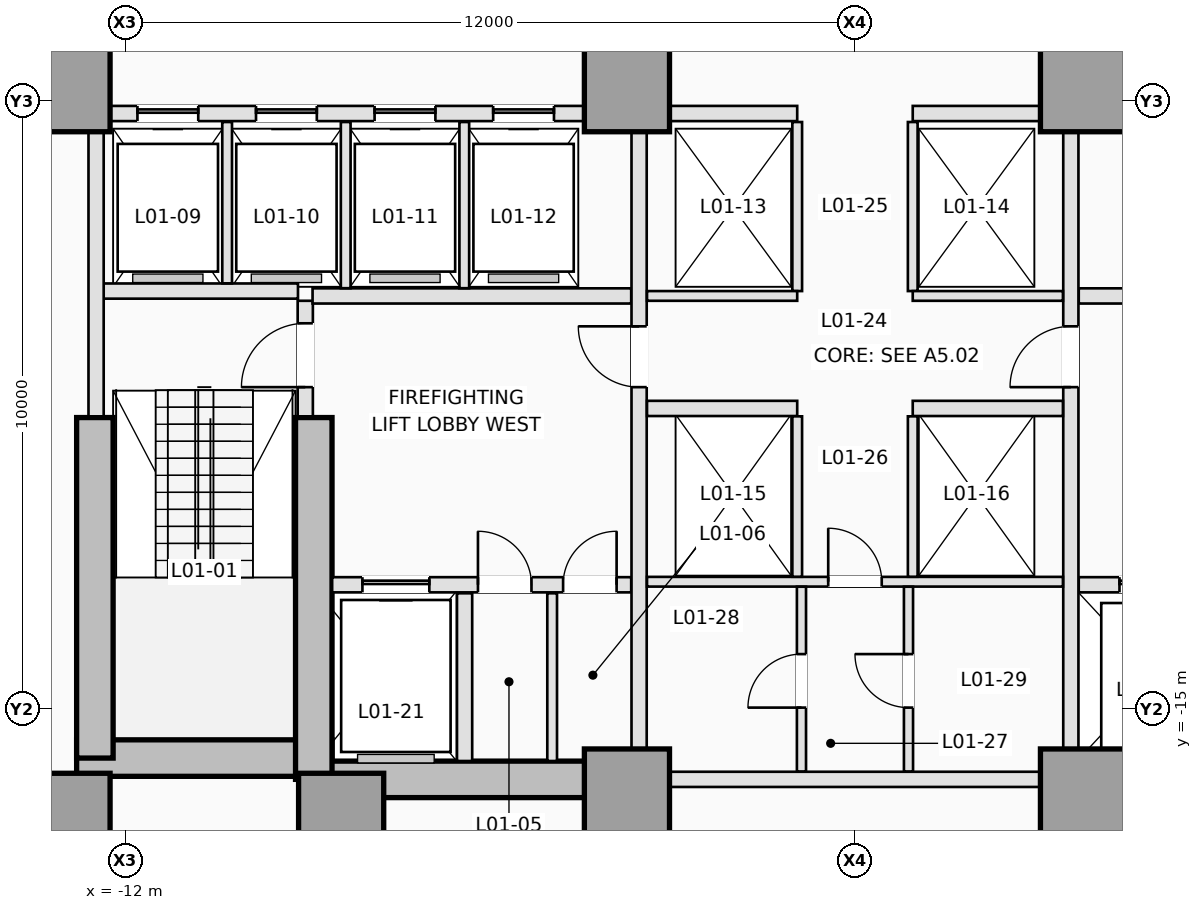
"""IFC4 building model, lengths in metres.
Left out: names, types, materials, properties, quantities, classifications, styles, units other than length and angle.
Written with IfcOpenShell. Run it as: python <this file> out.ifc"""

import sys

from ifc_helpers import new_model, si_unit, direction, frame, frame_2d, origin, origin_2d, place, context, subcontext, project, spatial, rectangle, extrude, element, fill, save


model = new_model("IFC4")
c1 = context("Model", 3, precision=1e-05, world=origin(), true_north=direction((0.0, 1.0)))
c2 = subcontext(c1, "Body", "Model", "MODEL_VIEW")
j1 = project(units=[si_unit("LENGTHUNIT", "METRE"), si_unit("PLANEANGLEUNIT", "RADIAN")], contexts=[c1])
p1 = place(None, origin())
s1 = spatial("IfcSite", under=j1, at=p1, CompositionType="ELEMENT")
p2 = place(p1, origin())
s2 = spatial("IfcBuilding", under=s1, at=p2, CompositionType="ELEMENT")
p3 = place(p2, frame((0.0, 0.0, 5.0)))
s3 = spatial("IfcBuildingStorey", under=s2, at=p3, CompositionType="ELEMENT", Elevation=5.0)
p4 = place(p3, frame((-12.8, -15.8, 0.0), z_axis=(0.0, 0.0, 1.0), x_axis=(1.0, 0.0, 0.0)))
e1 = element("IfcWall", 1, at=p4, inside=s3, PredefinedType="SHEAR", context=c2, shape_type="SweptSolid", body=[
    extrude(rectangle(XDim=4.2, YDim=0.6, at=frame_2d((2.1, 0.0))), origin(), (0.0, 0.0, 1.0), 4.5),
])
for number, where, z_axis, x_axis in (
    (2, (-8.9, -16.15, 0.0), (0.0, 0.0, 1.0), (1.0, 0.0, 0.0)),
    (3, (3.75, -16.15, 0.0), (0.0, 0.0, 1.0), (1.0, 0.0, 0.0)),
):
    element("IfcWall", number, at=place(p3, frame(where, z_axis=z_axis, x_axis=x_axis)), inside=s3, PredefinedType="SHEAR", context=c2, shape_type="SweptSolid", body=[
        extrude(rectangle(XDim=5.15, YDim=0.6, at=frame_2d((2.575, 0.0))), origin(), (0.0, 0.0, 1.0), 4.5),
    ])
p5 = place(p3, frame((-12.5, -15.8, 0.0), z_axis=(0.0, 0.0, 1.0), x_axis=(0.0, 1.0, 0.0)))
e4 = element("IfcWall", 4, at=p5, inside=s3, PredefinedType="SHEAR", context=c2, shape_type="SweptSolid", body=[
    extrude(rectangle(XDim=5.6, YDim=0.6, at=frame_2d((2.8, 0.0))), origin(), (0.0, 0.0, 1.0), 4.5),
])
p6 = place(p3, frame((-8.9, -16.15, 0.0), z_axis=(0.0, 0.0, 1.0), x_axis=(0.0, 1.0, 0.0)))
e5 = element("IfcWall", 5, at=p6, inside=s3, PredefinedType="SHEAR", context=c2, shape_type="SweptSolid", body=[
    extrude(rectangle(XDim=5.95, YDim=0.6, at=frame_2d((2.975, 0.0))), origin(), (0.0, 0.0, 1.0), 4.5),
])
for number, where, z_axis, x_axis in (
    (6, (-12.95, -16.75, 0.0), (0.0, 0.0, 1.0), (1.0, 0.0, 0.0)),
    (7, (-8.45, -16.75, 0.0), (0.0, 0.0, 1.0), (1.0, 0.0, 0.0)),
    (8, (-3.75, -16.35, 0.0), (0.0, 0.0, 1.0), (1.0, 0.0, 0.0)),
    (9, (3.75, -16.35, 0.0), (0.0, 0.0, 1.0), (1.0, 0.0, 0.0)),
    (10, (-12.95, -4.8, 0.0), (0.0, 0.0, 1.0), (1.0, 0.0, 0.0)),
    (11, (-3.75, -4.8, 0.0), (0.0, 0.0, 1.0), (1.0, 0.0, 0.0)),
    (12, (3.75, -4.8, 0.0), (0.0, 0.0, 1.0), (1.0, 0.0, 0.0)),
):
    element("IfcColumn", number, at=place(p3, frame(where, z_axis=z_axis, x_axis=x_axis)), inside=s3, PredefinedType="COLUMN", context=c2, shape_type="SweptSolid", body=[
        extrude(rectangle(XDim=1.4, YDim=1.4, at=origin_2d()), origin(), (0.0, 0.0, 1.0), 4.5),
    ])
p7 = place(p3, frame((-9.04, -10.18, 0.0), z_axis=(0.0, 0.0, 1.0), x_axis=(0.0, 1.0, 0.0)))
e13 = element("IfcWall", 13, at=p7, inside=s3, PredefinedType="PARTITIONING", context=c2, shape_type="SweptSolid", body=[
    extrude(rectangle(XDim=1.9, YDim=0.25, at=frame_2d((0.95, 0.0))), origin(), (0.0, 0.0, 1.0), 4.2),
])
p8 = place(p7, frame((0.48, 0.0, 0.0)))
e14 = element("IfcOpeningElement", 14, at=p8, cuts=e13, PredefinedType="OPENING", context=c2, shape_type="SweptSolid", body=[
    extrude(rectangle(XDim=1.05, YDim=2.15, at=frame_2d((0.525, 1.075))), frame((0.0, 0.135, 0.0), z_axis=(0.0, -1.0, 0.0), x_axis=(1.0, 0.0, 0.0)), (0.0, 0.0, 1.0), 0.27),
])
p9 = place(p3, frame((-12.38, -8.12, 0.0), z_axis=(0.0, 0.0, 1.0), x_axis=(1.0, 0.0, 0.0)))
e15 = element("IfcWall", 15, at=p9, inside=s3, PredefinedType="PARTITIONING", context=c2, shape_type="SweptSolid", body=[
    extrude(rectangle(XDim=3.22, YDim=0.25, at=frame_2d((1.61, 0.0))), origin(), (0.0, 0.0, 1.0), 4.2),
])
p10 = place(p3, frame((-12.48, -10.18, 0.0), z_axis=(0.0, 0.0, 1.0), x_axis=(0.0, 1.0, 0.0)))
e16 = element("IfcWall", 16, at=p10, inside=s3, PredefinedType="PARTITIONING", context=c2, shape_type="SweptSolid", body=[
    extrude(rectangle(XDim=4.678, YDim=0.25, at=frame_2d((2.339, 0.0))), origin(), (0.0, 0.0, 1.0), 4.2),
])
p11 = place(p3, frame((-8.598, -12.95, 0.0), z_axis=(0.0, 0.0, 1.0), x_axis=(1.0, 0.0, 0.0)))
e17 = element("IfcWall", 17, at=p11, inside=s3, PredefinedType="PARTITIONING", context=c2, shape_type="SweptSolid", body=[
    extrude(rectangle(XDim=4.918, YDim=0.25, at=frame_2d((2.459, 0.0))), origin(), (0.0, 0.0, 1.0), 4.2),
])
p12 = place(p11, frame((0.498, 0.0, 0.0)))
e18 = element("IfcOpeningElement", 18, at=p12, cuts=e17, PredefinedType="OPENING", context=c2, shape_type="SweptSolid", body=[
    extrude(rectangle(XDim=1.1, YDim=2.15, at=frame_2d((0.55, 1.075))), frame((0.0, 0.135, 0.0), z_axis=(0.0, -1.0, 0.0), x_axis=(1.0, 0.0, 0.0)), (0.0, 0.0, 1.0), 0.27),
])
p13 = place(p11, frame((2.398, 0.0, 0.0)))
e19 = element("IfcOpeningElement", 19, at=p13, cuts=e17, PredefinedType="OPENING", context=c2, shape_type="SweptSolid", body=[
    extrude(rectangle(XDim=0.88, YDim=2.1, at=frame_2d((0.44, 1.05))), frame((0.0, 0.135, 0.0), z_axis=(0.0, -1.0, 0.0), x_axis=(1.0, 0.0, 0.0)), (0.0, 0.0, 1.0), 0.27),
])
p14 = place(p11, frame((3.798, 0.0, 0.0)))
e20 = element("IfcOpeningElement", 20, at=p14, cuts=e17, PredefinedType="OPENING", context=c2, shape_type="SweptSolid", body=[
    extrude(rectangle(XDim=0.88, YDim=2.1, at=frame_2d((0.44, 1.05))), frame((0.0, 0.135, 0.0), z_axis=(0.0, -1.0, 0.0), x_axis=(1.0, 0.0, 0.0)), (0.0, 0.0, 1.0), 0.27),
])
p15 = place(p3, frame((3.68, -12.95, 0.0), z_axis=(0.0, 0.0, 1.0), x_axis=(1.0, 0.0, 0.0)))
e21 = element("IfcWall", 21, at=p15, inside=s3, PredefinedType="PARTITIONING", context=c2, shape_type="SweptSolid", body=[
    extrude(rectangle(XDim=4.918, YDim=0.25, at=frame_2d((2.459, 0.0))), origin(), (0.0, 0.0, 1.0), 4.2),
])
p16 = place(p15, frame((3.32, 0.0, 0.0)))
e22 = element("IfcOpeningElement", 22, at=p16, cuts=e21, PredefinedType="OPENING", context=c2, shape_type="SweptSolid", body=[
    extrude(rectangle(XDim=1.1, YDim=2.15, at=frame_2d((0.55, 1.075))), frame((0.0, 0.135, 0.0), z_axis=(0.0, -1.0, 0.0), x_axis=(1.0, 0.0, 0.0)), (0.0, 0.0, 1.0), 0.27),
])
p17 = place(p15, frame((0.67, 0.0, 0.0)))
e23 = element("IfcOpeningElement", 23, at=p17, cuts=e21, PredefinedType="OPENING", context=c2, shape_type="SweptSolid", body=[
    extrude(rectangle(XDim=1.2, YDim=2.15, at=frame_2d((0.6, 1.075))), frame((0.0, 0.135, 0.0), z_axis=(0.0, -1.0, 0.0), x_axis=(1.0, 0.0, 0.0)), (0.0, 0.0, 1.0), 0.27),
])
p18 = place(p3, frame((-6.42, -15.848, 0.0), z_axis=(0.0, 0.0, 1.0), x_axis=(0.0, 1.0, 0.0)))
e24 = element("IfcWall", 24, at=p18, inside=s3, PredefinedType="PARTITIONING", context=c2, shape_type="SweptSolid", body=[
    extrude(rectangle(XDim=2.758, YDim=0.25, at=frame_2d((1.379, 0.0))), origin(), (0.0, 0.0, 1.0), 4.2),
])
p19 = place(p3, frame((-4.98, -15.848, 0.0), z_axis=(0.0, 0.0, 1.0), x_axis=(0.0, 1.0, 0.0)))
e25 = element("IfcWall", 25, at=p19, inside=s3, PredefinedType="PARTITIONING", context=c2, shape_type="SweptSolid", body=[
    extrude(rectangle(XDim=2.758, YDim=0.16, at=frame_2d((1.379, 0.0))), origin(), (0.0, 0.0, 1.0), 4.2),
])
for number, where, z_axis, x_axis in (
    (26, (-8.92, -8.2, 0.0), (0.0, 0.0, 1.0), (1.0, 0.0, 0.0)),
    (27, (3.68, -8.2, 0.0), (0.0, 0.0, 1.0), (1.0, 0.0, 0.0)),
):
    element("IfcWall", number, at=place(p3, frame(where, z_axis=z_axis, x_axis=x_axis)), inside=s3, PredefinedType="PARTITIONING", context=c2, shape_type="SweptSolid", body=[
        extrude(rectangle(XDim=5.24, YDim=0.25, at=frame_2d((2.62, 0.0))), origin(), (0.0, 0.0, 1.0), 4.2),
    ])
p20 = place(p3, frame((-3.55, -15.648, 0.0), z_axis=(0.0, 0.0, 1.0), x_axis=(0.0, 1.0, 0.0)))
e28 = element("IfcWall", 28, at=p20, inside=s3, PredefinedType="PARTITIONING", context=c2, shape_type="SweptSolid", body=[
    extrude(rectangle(XDim=10.146, YDim=0.25, at=frame_2d((5.073, 0.0))), origin(), (0.0, 0.0, 1.0), 4.2),
])
p21 = place(p20, frame((5.948, 0.0, 0.0)))
e29 = element("IfcOpeningElement", 29, at=p21, cuts=e28, PredefinedType="OPENING", context=c2, shape_type="SweptSolid", body=[
    extrude(rectangle(XDim=1.0, YDim=2.15, at=frame_2d((0.5, 1.075))), frame((0.0, 0.135, 0.0), z_axis=(0.0, -1.0, 0.0), x_axis=(1.0, 0.0, 0.0)), (0.0, 0.0, 1.0), 0.27),
])
p22 = place(p3, frame((3.55, -15.648, 0.0), z_axis=(0.0, 0.0, 1.0), x_axis=(0.0, 1.0, 0.0)))
e30 = element("IfcWall", 30, at=p22, inside=s3, PredefinedType="PARTITIONING", context=c2, shape_type="SweptSolid", body=[
    extrude(rectangle(XDim=10.146, YDim=0.25, at=frame_2d((5.073, 0.0))), origin(), (0.0, 0.0, 1.0), 4.2),
])
p23 = place(p22, frame((5.948, 0.0, 0.0)))
e31 = element("IfcOpeningElement", 31, at=p23, cuts=e30, PredefinedType="OPENING", context=c2, shape_type="SweptSolid", body=[
    extrude(rectangle(XDim=1.0, YDim=2.15, at=frame_2d((0.5, 1.075))), frame((0.0, 0.135, 0.0), z_axis=(0.0, -1.0, 0.0), x_axis=(1.0, 0.0, 0.0)), (0.0, 0.0, 1.0), 0.27),
])
p24 = place(p3, frame((-12.248, -5.2, 0.0), z_axis=(0.0, 0.0, 1.0), x_axis=(1.0, 0.0, 0.0)))
e32 = element("IfcWall", 32, at=p24, inside=s3, PredefinedType="PARTITIONING", context=c2, shape_type="SweptSolid", body=[
    extrude(rectangle(XDim=7.796, YDim=0.25, at=frame_2d((3.898, 0.0))), origin(), (0.0, 0.0, 1.0), 4.2),
])
p25 = place(p24, frame((0.448, 0.0, 0.0)))
e33 = element("IfcOpeningElement", 33, at=p25, cuts=e32, PredefinedType="OPENING", context=c2, shape_type="SweptSolid", body=[
    extrude(rectangle(XDim=1.0, YDim=2.15, at=frame_2d((0.5, 1.075))), frame((0.0, 0.135, 0.0), z_axis=(0.0, -1.0, 0.0), x_axis=(1.0, 0.0, 0.0)), (0.0, 0.0, 1.0), 0.27),
])
p26 = place(p24, frame((2.398, 0.0, 0.0)))
e34 = element("IfcOpeningElement", 34, at=p26, cuts=e32, PredefinedType="OPENING", context=c2, shape_type="SweptSolid", body=[
    extrude(rectangle(XDim=1.0, YDim=2.15, at=frame_2d((0.5, 1.075))), frame((0.0, 0.135, 0.0), z_axis=(0.0, -1.0, 0.0), x_axis=(1.0, 0.0, 0.0)), (0.0, 0.0, 1.0), 0.27),
])
p27 = place(p24, frame((4.348, 0.0, 0.0)))
e35 = element("IfcOpeningElement", 35, at=p27, cuts=e32, PredefinedType="OPENING", context=c2, shape_type="SweptSolid", body=[
    extrude(rectangle(XDim=1.0, YDim=2.15, at=frame_2d((0.5, 1.075))), frame((0.0, 0.135, 0.0), z_axis=(0.0, -1.0, 0.0), x_axis=(1.0, 0.0, 0.0)), (0.0, 0.0, 1.0), 0.27),
])
p28 = place(p24, frame((6.298, 0.0, 0.0)))
e36 = element("IfcOpeningElement", 36, at=p28, cuts=e32, PredefinedType="OPENING", context=c2, shape_type="SweptSolid", body=[
    extrude(rectangle(XDim=1.0, YDim=2.15, at=frame_2d((0.5, 1.075))), frame((0.0, 0.135, 0.0), z_axis=(0.0, -1.0, 0.0), x_axis=(1.0, 0.0, 0.0)), (0.0, 0.0, 1.0), 0.27),
])
for number, where, z_axis, x_axis in (
    (37, (-3.048, -5.2, 0.0), (0.0, 0.0, 1.0), (1.0, 0.0, 0.0)),
    (38, (0.95, -5.2, 0.0), (0.0, 0.0, 1.0), (1.0, 0.0, 0.0)),
):
    element("IfcWall", number, at=place(p3, frame(where, z_axis=z_axis, x_axis=x_axis)), inside=s3, PredefinedType="PARTITIONING", context=c2, shape_type="SweptSolid", body=[
        extrude(rectangle(XDim=2.098, YDim=0.25, at=frame_2d((1.049, 0.0))), origin(), (0.0, 0.0, 1.0), 4.2),
    ])
p29 = place(p3, frame((-10.325, -7.993, 0.0), z_axis=(0.0, 0.0, 1.0), x_axis=(0.0, 1.0, 0.0)))
e39 = element("IfcWall", 39, at=p29, inside=s3, PredefinedType="PARTITIONING", context=c2, shape_type="SweptSolid", body=[
    extrude(rectangle(XDim=2.653, YDim=0.16, at=frame_2d((1.326, 0.0))), origin(), (0.0, 0.0, 1.0), 4.2),
])
for number, where, z_axis, x_axis in (
    (40, (-8.375, -8.073, 0.0), (0.0, 0.0, 1.0), (0.0, 1.0, 0.0)),
    (41, (-6.425, -8.073, 0.0), (0.0, 0.0, 1.0), (0.0, 1.0, 0.0)),
):
    element("IfcWall", number, at=place(p3, frame(where, z_axis=z_axis, x_axis=x_axis)), inside=s3, PredefinedType="PARTITIONING", context=c2, shape_type="SweptSolid", body=[
        extrude(rectangle(XDim=2.733, YDim=0.16, at=frame_2d((1.366, 0.0))), origin(), (0.0, 0.0, 1.0), 4.2),
    ])
p30 = place(p3, frame((-3.048, -16.15, 0.0), z_axis=(0.0, 0.0, 1.0), x_axis=(1.0, 0.0, 0.0)))
e42 = element("IfcWall", 42, at=p30, inside=s3, PredefinedType="PARTITIONING", context=c2, shape_type="SweptSolid", body=[
    extrude(rectangle(XDim=6.096, YDim=0.25, at=frame_2d((3.048, 0.0))), origin(), (0.0, 0.0, 1.0), 3.176),
])
for number, where, z_axis, x_axis in (
    (43, (-0.95, -8.12, 0.0), (0.0, 0.0, 1.0), (0.0, 1.0, 0.0)),
    (44, (0.95, -8.12, 0.0), (0.0, 0.0, 1.0), (0.0, 1.0, 0.0)),
):
    element("IfcWall", number, at=place(p3, frame(where, z_axis=z_axis, x_axis=x_axis)), inside=s3, PredefinedType="PARTITIONING", context=c2, shape_type="SweptSolid", body=[
        extrude(rectangle(XDim=2.78, YDim=0.16, at=frame_2d((1.39, 0.0))), origin(), (0.0, 0.0, 1.0), 4.2),
    ])
for number, where, z_axis, x_axis in (
    (45, (-3.42, -8.2, 0.0), (0.0, 0.0, 1.0), (1.0, 0.0, 0.0)),
    (46, (0.95, -8.2, 0.0), (0.0, 0.0, 1.0), (1.0, 0.0, 0.0)),
):
    element("IfcWall", number, at=place(p3, frame(where, z_axis=z_axis, x_axis=x_axis)), inside=s3, PredefinedType="PARTITIONING", context=c2, shape_type="SweptSolid", body=[
        extrude(rectangle(XDim=2.47, YDim=0.16, at=frame_2d((1.235, 0.0))), origin(), (0.0, 0.0, 1.0), 4.2),
    ])
for number, where, z_axis, x_axis in (
    (47, (-3.42, -10.05, 0.0), (0.0, 0.0, 1.0), (1.0, 0.0, 0.0)),
    (48, (0.95, -10.05, 0.0), (0.0, 0.0, 1.0), (1.0, 0.0, 0.0)),
):
    element("IfcWall", number, at=place(p3, frame(where, z_axis=z_axis, x_axis=x_axis)), inside=s3, PredefinedType="PARTITIONING", context=c2, shape_type="SweptSolid", body=[
        extrude(rectangle(XDim=2.47, YDim=0.25, at=frame_2d((1.235, 0.0))), origin(), (0.0, 0.0, 1.0), 4.2),
    ])
p31 = place(p3, frame((-3.42, -12.9, 0.0), z_axis=(0.0, 0.0, 1.0), x_axis=(1.0, 0.0, 0.0)))
e49 = element("IfcWall", 49, at=p31, inside=s3, PredefinedType="PARTITIONING", context=c2, shape_type="SweptSolid", body=[
    extrude(rectangle(XDim=6.84, YDim=0.16, at=frame_2d((3.42, 0.0))), origin(), (0.0, 0.0, 1.0), 4.2),
])
p32 = place(p31, frame((2.98, 0.0, 0.0)))
e50 = element("IfcOpeningElement", 50, at=p32, cuts=e49, PredefinedType="OPENING", context=c2, shape_type="SweptSolid", body=[
    extrude(rectangle(XDim=0.88, YDim=2.12, at=frame_2d((0.44, 1.06))), frame((0.0, 0.09, 0.0), z_axis=(0.0, -1.0, 0.0), x_axis=(1.0, 0.0, 0.0)), (0.0, 0.0, 1.0), 0.18),
])
for number, where, z_axis, x_axis in (
    (51, (-0.95, -12.818, 0.0), (0.0, 0.0, 1.0), (0.0, 1.0, 0.0)),
    (52, (0.95, -12.818, 0.0), (0.0, 0.0, 1.0), (0.0, 1.0, 0.0)),
):
    element("IfcWall", number, at=place(p3, frame(where, z_axis=z_axis, x_axis=x_axis)), inside=s3, PredefinedType="PARTITIONING", context=c2, shape_type="SweptSolid", body=[
        extrude(rectangle(XDim=2.638, YDim=0.16, at=frame_2d((1.319, 0.0))), origin(), (0.0, 0.0, 1.0), 4.2),
    ])
p33 = place(p3, frame((-0.88, -16.02, 0.0), z_axis=(0.0, 0.0, 1.0), x_axis=(0.0, 1.0, 0.0)))
e53 = element("IfcWall", 53, at=p33, inside=s3, PredefinedType="PARTITIONING", context=c2, shape_type="SweptSolid", body=[
    extrude(rectangle(XDim=3.038, YDim=0.15, at=frame_2d((1.519, 0.0))), origin(), (0.0, 0.0, 1.0), 4.2),
])
p34 = place(p33, frame((1.05, 0.0, 0.0)))
e54 = element("IfcOpeningElement", 54, at=p34, cuts=e53, PredefinedType="OPENING", context=c2, shape_type="SweptSolid", body=[
    extrude(rectangle(XDim=0.88, YDim=2.12, at=frame_2d((0.44, 1.06))), frame((0.0, 0.085, 0.0), z_axis=(0.0, -1.0, 0.0), x_axis=(1.0, 0.0, 0.0)), (0.0, 0.0, 1.0), 0.17),
])
p35 = place(p3, frame((0.88, -16.02, 0.0), z_axis=(0.0, 0.0, 1.0), x_axis=(0.0, 1.0, 0.0)))
e55 = element("IfcWall", 55, at=p35, inside=s3, PredefinedType="PARTITIONING", context=c2, shape_type="SweptSolid", body=[
    extrude(rectangle(XDim=3.038, YDim=0.15, at=frame_2d((1.519, 0.0))), origin(), (0.0, 0.0, 1.0), 4.2),
])
p36 = place(p35, frame((1.05, 0.0, 0.0)))
e56 = element("IfcOpeningElement", 56, at=p36, cuts=e55, PredefinedType="OPENING", context=c2, shape_type="SweptSolid", body=[
    extrude(rectangle(XDim=0.88, YDim=2.12, at=frame_2d((0.44, 1.06))), frame((0.0, 0.085, 0.0), z_axis=(0.0, -1.0, 0.0), x_axis=(1.0, 0.0, 0.0)), (0.0, 0.0, 1.0), 0.17),
])
p37 = place(p25, origin())
e57 = element("IfcDoor", 57, at=p37, inside=s3, OperationType="SLIDING_TO_LEFT", PredefinedType="DOOR", context=c2, shape_type="SweptSolid", body=[
    extrude(rectangle(XDim=1.0, YDim=2.15, at=frame_2d((0.5, 1.075))), frame((0.0, 0.025, 0.0), z_axis=(0.0, -1.0, 0.0), x_axis=(1.0, 0.0, 0.0)), (0.0, 0.0, 1.0), 0.05),
])
fill(e33, e57)
p38 = place(p26, origin())
e58 = element("IfcDoor", 58, at=p38, inside=s3, OperationType="SLIDING_TO_LEFT", PredefinedType="DOOR", context=c2, shape_type="SweptSolid", body=[
    extrude(rectangle(XDim=1.0, YDim=2.15, at=frame_2d((0.5, 1.075))), frame((0.0, 0.025, 0.0), z_axis=(0.0, -1.0, 0.0), x_axis=(1.0, 0.0, 0.0)), (0.0, 0.0, 1.0), 0.05),
])
fill(e34, e58)
p39 = place(p27, origin())
e59 = element("IfcDoor", 59, at=p39, inside=s3, OperationType="SLIDING_TO_LEFT", PredefinedType="DOOR", context=c2, shape_type="SweptSolid", body=[
    extrude(rectangle(XDim=1.0, YDim=2.15, at=frame_2d((0.5, 1.075))), frame((0.0, 0.025, 0.0), z_axis=(0.0, -1.0, 0.0), x_axis=(1.0, 0.0, 0.0)), (0.0, 0.0, 1.0), 0.05),
])
fill(e35, e59)
p40 = place(p28, origin())
e60 = element("IfcDoor", 60, at=p40, inside=s3, OperationType="SLIDING_TO_LEFT", PredefinedType="DOOR", context=c2, shape_type="SweptSolid", body=[
    extrude(rectangle(XDim=1.0, YDim=2.15, at=frame_2d((0.5, 1.075))), frame((0.0, 0.025, 0.0), z_axis=(0.0, -1.0, 0.0), x_axis=(1.0, 0.0, 0.0)), (0.0, 0.0, 1.0), 0.05),
])
fill(e36, e60)
p41 = place(p12, origin())
e61 = element("IfcDoor", 61, at=p41, inside=s3, OperationType="SLIDING_TO_LEFT", PredefinedType="DOOR", context=c2, shape_type="SweptSolid", body=[
    extrude(rectangle(XDim=1.1, YDim=2.15, at=frame_2d((0.55, 1.075))), frame((0.0, 0.025, 0.0), z_axis=(0.0, -1.0, 0.0), x_axis=(1.0, 0.0, 0.0)), (0.0, 0.0, 1.0), 0.05),
])
fill(e18, e61)
p42 = place(p17, origin())
e62 = element("IfcDoor", 62, at=p42, inside=s3, OperationType="SLIDING_TO_LEFT", PredefinedType="DOOR", context=c2, shape_type="SweptSolid", body=[
    extrude(rectangle(XDim=1.2, YDim=2.15, at=frame_2d((0.6, 1.075))), frame((0.0, 0.025, 0.0), z_axis=(0.0, -1.0, 0.0), x_axis=(1.0, 0.0, 0.0)), (0.0, 0.0, 1.0), 0.05),
])
fill(e23, e62)
p43 = place(p8, origin())
e63 = element("IfcDoor", 63, at=p43, inside=s3, OperationType="SINGLE_SWING_LEFT", PredefinedType="DOOR", context=c2, shape_type="SweptSolid", body=[
    extrude(rectangle(XDim=1.05, YDim=2.15, at=frame_2d((0.525, 1.075))), frame((0.0, 0.025, 0.0), z_axis=(0.0, -1.0, 0.0), x_axis=(1.0, 0.0, 0.0)), (0.0, 0.0, 1.0), 0.05),
])
fill(e14, e63)
p44 = place(p13, origin())
e64 = element("IfcDoor", 64, at=p44, inside=s3, OperationType="SINGLE_SWING_LEFT", PredefinedType="TRAPDOOR", context=c2, shape_type="SweptSolid", body=[
    extrude(rectangle(XDim=0.88, YDim=2.1, at=frame_2d((0.44, 1.05))), frame((0.0, 0.025, 0.0), z_axis=(0.0, -1.0, 0.0), x_axis=(1.0, 0.0, 0.0)), (0.0, 0.0, 1.0), 0.05),
])
fill(e19, e64)
p45 = place(p14, origin())
e65 = element("IfcDoor", 65, at=p45, inside=s3, OperationType="SINGLE_SWING_RIGHT", PredefinedType="TRAPDOOR", context=c2, shape_type="SweptSolid", body=[
    extrude(rectangle(XDim=0.88, YDim=2.1, at=frame_2d((0.44, 1.05))), frame((0.0, 0.025, 0.0), z_axis=(0.0, -1.0, 0.0), x_axis=(1.0, 0.0, 0.0)), (0.0, 0.0, 1.0), 0.05),
])
fill(e20, e65)
p46 = place(p21, origin())
e66 = element("IfcDoor", 66, at=p46, inside=s3, OperationType="SINGLE_SWING_RIGHT", PredefinedType="DOOR", context=c2, shape_type="SweptSolid", body=[
    extrude(rectangle(XDim=1.0, YDim=2.15, at=frame_2d((0.5, 1.075))), frame((0.0, 0.025, 0.0), z_axis=(0.0, -1.0, 0.0), x_axis=(1.0, 0.0, 0.0)), (0.0, 0.0, 1.0), 0.05),
])
fill(e29, e66)
p47 = place(p23, origin())
e67 = element("IfcDoor", 67, at=p47, inside=s3, OperationType="SINGLE_SWING_LEFT", PredefinedType="DOOR", context=c2, shape_type="SweptSolid", body=[
    extrude(rectangle(XDim=1.0, YDim=2.15, at=frame_2d((0.5, 1.075))), frame((0.0, 0.025, 0.0), z_axis=(0.0, -1.0, 0.0), x_axis=(1.0, 0.0, 0.0)), (0.0, 0.0, 1.0), 0.05),
])
fill(e31, e67)
p48 = place(p32, origin())
e68 = element("IfcDoor", 68, at=p48, inside=s3, OperationType="SINGLE_SWING_LEFT", PredefinedType="DOOR", context=c2, shape_type="SweptSolid", body=[
    extrude(rectangle(XDim=0.88, YDim=2.12, at=frame_2d((0.44, 1.06))), frame((0.0, 0.025, 0.0), z_axis=(0.0, -1.0, 0.0), x_axis=(1.0, 0.0, 0.0)), (0.0, 0.0, 1.0), 0.05),
])
fill(e50, e68)
p49 = place(p34, origin())
e69 = element("IfcDoor", 69, at=p49, inside=s3, OperationType="SINGLE_SWING_LEFT", PredefinedType="DOOR", context=c2, shape_type="SweptSolid", body=[
    extrude(rectangle(XDim=0.88, YDim=2.12, at=frame_2d((0.44, 1.06))), frame((0.0, 0.025, 0.0), z_axis=(0.0, -1.0, 0.0), x_axis=(1.0, 0.0, 0.0)), (0.0, 0.0, 1.0), 0.05),
])
fill(e54, e69)
p50 = place(p36, origin())
e70 = element("IfcDoor", 70, at=p50, inside=s3, OperationType="SINGLE_SWING_RIGHT", PredefinedType="DOOR", context=c2, shape_type="SweptSolid", body=[
    extrude(rectangle(XDim=0.88, YDim=2.12, at=frame_2d((0.44, 1.06))), frame((0.0, 0.025, 0.0), z_axis=(0.0, -1.0, 0.0), x_axis=(1.0, 0.0, 0.0)), (0.0, 0.0, 1.0), 0.05),
])
fill(e56, e70)
save(model, sys.argv[1])
